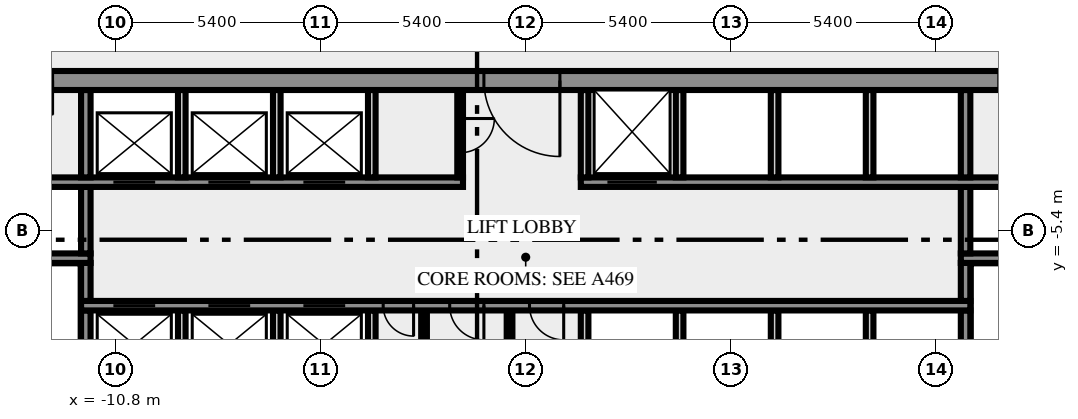
"""IFC4 building model, lengths in metres.
Left out: names, types, materials, properties, quantities, classifications, styles, units other than length and angle.
Written with IfcOpenShell. Run it as: python <this file> out.ifc"""

import sys

from ifc_helpers import new_model, si_unit, direction, frame, frame_2d, origin, place, context, subcontext, project, spatial, rectangle, extrude, element, fill, save


model = new_model("IFC4")
c1 = context("Model", 3, precision=1e-05, world=origin(), true_north=direction((0.0, 1.0)))
c2 = subcontext(c1, "Body", "Model", "MODEL_VIEW")
j1 = project(units=[si_unit("LENGTHUNIT", "METRE"), si_unit("PLANEANGLEUNIT", "RADIAN")], contexts=[c1])
p1 = place(None, origin())
s1 = spatial("IfcSite", under=j1, at=p1, CompositionType="ELEMENT")
p2 = place(p1, origin())
s2 = spatial("IfcBuilding", under=s1, at=p2, CompositionType="ELEMENT")
p3 = place(p2, frame((0.0, 0.0, 105.0)))
s3 = spatial("IfcBuildingStorey", under=s2, at=p3, CompositionType="ELEMENT", Elevation=105.0)
p4 = place(p3, frame((-11.575, -10.5, 0.0), z_axis=(0.0, 0.0, 1.0), x_axis=(0.0, 1.0, 0.0)))
e1 = element("IfcWall", 1, at=p4, inside=s3, PredefinedType="SHEAR", context=c2, shape_type="SweptSolid", body=[
    extrude(rectangle(XDim=3.0, YDim=0.25, at=frame_2d((1.5, 0.0))), origin(), (0.0, 0.0, 1.0), 3.65),
])
for number, where, z_axis, x_axis in (
    (2, (-9.05, -10.5, 0.0), (0.0, 0.0, 1.0), (0.0, 1.0, 0.0)),
    (3, (-6.55, -10.5, 0.0), (0.0, 0.0, 1.0), (0.0, 1.0, 0.0)),
    (4, (-4.05, -10.5, 0.0), (0.0, 0.0, 1.0), (0.0, 1.0, 0.0)),
):
    element("IfcWall", number, at=place(p3, frame(where, z_axis=z_axis, x_axis=x_axis)), inside=s3, PredefinedType="SOLIDWALL", context=c2, shape_type="SweptSolid", body=[
        extrude(rectangle(XDim=3.0, YDim=0.2, at=frame_2d((1.5, 0.0))), origin(), (0.0, 0.0, 1.0), 3.65),
    ])
for number, where, z_axis, x_axis in (
    (5, (-2.675, -10.5, 0.0), (0.0, 0.0, 1.0), (0.0, 1.0, 0.0)),
    (6, (-0.425, -10.5, 0.0), (0.0, 0.0, 1.0), (0.0, 1.0, 0.0)),
):
    element("IfcWall", number, at=place(p3, frame(where, z_axis=z_axis, x_axis=x_axis)), inside=s3, PredefinedType="PARTITIONING", context=c2, shape_type="SweptSolid", body=[
        extrude(rectangle(XDim=3.0, YDim=0.15, at=frame_2d((1.5, 0.0))), origin(), (0.0, 0.0, 1.0), 3.65),
    ])
for number, where, z_axis, x_axis in (
    (7, (1.55, -10.5, 0.0), (0.0, 0.0, 1.0), (0.0, 1.0, 0.0)),
    (8, (4.05, -10.5, 0.0), (0.0, 0.0, 1.0), (0.0, 1.0, 0.0)),
    (9, (6.55, -10.5, 0.0), (0.0, 0.0, 1.0), (0.0, 1.0, 0.0)),
    (10, (9.05, -10.5, 0.0), (0.0, 0.0, 1.0), (0.0, 1.0, 0.0)),
):
    element("IfcWall", number, at=place(p3, frame(where, z_axis=z_axis, x_axis=x_axis)), inside=s3, PredefinedType="SOLIDWALL", context=c2, shape_type="SweptSolid", body=[
        extrude(rectangle(XDim=3.0, YDim=0.2, at=frame_2d((1.5, 0.0))), origin(), (0.0, 0.0, 1.0), 3.65),
    ])
p5 = place(p3, frame((11.575, -10.5, 0.0), z_axis=(0.0, 0.0, 1.0), x_axis=(0.0, 1.0, 0.0)))
e11 = element("IfcWall", 11, at=p5, inside=s3, PredefinedType="SHEAR", context=c2, shape_type="SweptSolid", body=[
    extrude(rectangle(XDim=3.0, YDim=0.25, at=frame_2d((1.5, 0.0))), origin(), (0.0, 0.0, 1.0), 3.65),
])
p6 = place(p3, frame((11.7, -7.375, 0.0), z_axis=(0.0, 0.0, 1.0), x_axis=(-1.0, 0.0, 0.0)))
e12 = element("IfcWall", 12, at=p6, inside=s3, PredefinedType="SHEAR", context=c2, shape_type="SweptSolid", body=[
    extrude(rectangle(XDim=23.4, YDim=0.25, at=frame_2d((11.7, 0.0))), origin(), (0.0, 0.0, 1.0), 3.65),
])
p7 = place(p6, frame((21.45, 0.0, 0.0)))
e13 = element("IfcOpeningElement", 13, at=p7, cuts=e12, PredefinedType="OPENING", context=c2, shape_type="SweptSolid", body=[
    extrude(rectangle(XDim=1.1, YDim=2.1, at=frame_2d((0.55, 1.05))), frame((0.0, 0.135, 0.0), z_axis=(0.0, -1.0, 0.0), x_axis=(1.0, 0.0, 0.0)), (0.0, 0.0, 1.0), 0.27),
])
p8 = place(p6, frame((18.95, 0.0, 0.0)))
e14 = element("IfcOpeningElement", 14, at=p8, cuts=e12, PredefinedType="OPENING", context=c2, shape_type="SweptSolid", body=[
    extrude(rectangle(XDim=1.1, YDim=2.1, at=frame_2d((0.55, 1.05))), frame((0.0, 0.135, 0.0), z_axis=(0.0, -1.0, 0.0), x_axis=(1.0, 0.0, 0.0)), (0.0, 0.0, 1.0), 0.27),
])
p9 = place(p6, frame((16.45, 0.0, 0.0)))
e15 = element("IfcOpeningElement", 15, at=p9, cuts=e12, PredefinedType="OPENING", context=c2, shape_type="SweptSolid", body=[
    extrude(rectangle(XDim=1.1, YDim=2.1, at=frame_2d((0.55, 1.05))), frame((0.0, 0.135, 0.0), z_axis=(0.0, -1.0, 0.0), x_axis=(1.0, 0.0, 0.0)), (0.0, 0.0, 1.0), 0.27),
])
p10 = place(p6, frame((14.65, 0.0, 0.0)))
e16 = element("IfcOpeningElement", 16, at=p10, cuts=e12, PredefinedType="OPENING", context=c2, shape_type="SweptSolid", body=[
    extrude(rectangle(XDim=0.8, YDim=2.1, at=frame_2d((0.4, 1.05))), frame((0.0, 0.135, 0.0), z_axis=(0.0, -1.0, 0.0), x_axis=(1.0, 0.0, 0.0)), (0.0, 0.0, 1.0), 0.27),
])
p11 = place(p6, frame((12.8, 0.0, 0.0)))
e17 = element("IfcOpeningElement", 17, at=p11, cuts=e12, PredefinedType="OPENING", context=c2, shape_type="SweptSolid", body=[
    extrude(rectangle(XDim=0.9, YDim=2.1, at=frame_2d((0.45, 1.05))), frame((0.0, 0.135, 0.0), z_axis=(0.0, -1.0, 0.0), x_axis=(1.0, 0.0, 0.0)), (0.0, 0.0, 1.0), 0.27),
])
p12 = place(p6, frame((10.7, 0.0, 0.0)))
e18 = element("IfcOpeningElement", 18, at=p12, cuts=e12, PredefinedType="OPENING", context=c2, shape_type="SweptSolid", body=[
    extrude(rectangle(XDim=0.9, YDim=2.1, at=frame_2d((0.45, 1.05))), frame((0.0, 0.135, 0.0), z_axis=(0.0, -1.0, 0.0), x_axis=(1.0, 0.0, 0.0)), (0.0, 0.0, 1.0), 0.27),
])
for number, where, z_axis, x_axis in (
    (19, (-11.575, -7.25, 0.0), (0.0, 0.0, 1.0), (0.0, 1.0, 0.0)),
    (20, (11.575, -7.25, 0.0), (0.0, 0.0, 1.0), (0.0, 1.0, 0.0)),
):
    element("IfcWall", number, at=place(p3, frame(where, z_axis=z_axis, x_axis=x_axis)), inside=s3, PredefinedType="SHEAR", context=c2, shape_type="SweptSolid", body=[
        extrude(rectangle(XDim=1.0, YDim=0.25, at=frame_2d((0.5, 0.0))), origin(), (0.0, 0.0, 1.0), 3.65),
    ])
p13 = place(p3, frame((-11.45, -6.125, 0.0), z_axis=(0.0, 0.0, 1.0), x_axis=(-1.0, 0.0, 0.0)))
e21 = element("IfcWall", 21, at=p13, inside=s3, PredefinedType="SHEAR", context=c2, shape_type="SweptSolid", body=[
    extrude(rectangle(XDim=8.05, YDim=0.25, at=frame_2d((4.025, 0.0))), origin(), (0.0, 0.0, 1.0), 3.65),
])
p14 = place(p13, frame((6.2, 0.0, 0.0)))
e22 = element("IfcOpeningElement", 22, at=p14, cuts=e21, PredefinedType="OPENING", context=c2, shape_type="SweptSolid", body=[
    extrude(rectangle(XDim=1.8, YDim=2.1, at=frame_2d((0.9, 1.05))), frame((0.0, 0.135, 0.0), z_axis=(0.0, -1.0, 0.0), x_axis=(1.0, 0.0, 0.0)), (0.0, 0.0, 1.0), 0.27),
])
p15 = place(p3, frame((19.5, -6.125, 0.0), z_axis=(0.0, 0.0, 1.0), x_axis=(-1.0, 0.0, 0.0)))
e23 = element("IfcWall", 23, at=p15, inside=s3, PredefinedType="SHEAR", context=c2, shape_type="SweptSolid", body=[
    extrude(rectangle(XDim=8.05, YDim=0.25, at=frame_2d((4.025, 0.0))), origin(), (0.0, 0.0, 1.0), 3.65),
])
p16 = place(p15, frame((0.05, 0.0, 0.0)))
e24 = element("IfcOpeningElement", 24, at=p16, cuts=e23, PredefinedType="OPENING", context=c2, shape_type="SweptSolid", body=[
    extrude(rectangle(XDim=1.8, YDim=2.1, at=frame_2d((0.9, 1.05))), frame((0.0, 0.135, 0.0), z_axis=(0.0, -1.0, 0.0), x_axis=(1.0, 0.0, 0.0)), (0.0, 0.0, 1.0), 0.27),
])
for number, where, z_axis, x_axis in (
    (25, (-11.575, -6.0, 0.0), (0.0, 0.0, 1.0), (0.0, 1.0, 0.0)),
    (26, (11.575, -6.0, 0.0), (0.0, 0.0, 1.0), (0.0, 1.0, 0.0)),
):
    element("IfcWall", number, at=place(p3, frame(where, z_axis=z_axis, x_axis=x_axis)), inside=s3, PredefinedType="SHEAR", context=c2, shape_type="SweptSolid", body=[
        extrude(rectangle(XDim=1.75, YDim=0.25, at=frame_2d((0.875, 0.0))), origin(), (0.0, 0.0, 1.0), 3.65),
    ])
p17 = place(p3, frame((-14.35, -4.125, 0.0), z_axis=(0.0, 0.0, 1.0), x_axis=(1.0, 0.0, 0.0)))
e27 = element("IfcWall", 27, at=p17, inside=s3, PredefinedType="SHEAR", context=c2, shape_type="SweptSolid", body=[
    extrude(rectangle(XDim=12.7, YDim=0.25, at=frame_2d((6.35, 0.0))), origin(), (0.0, 0.0, 1.0), 3.65),
])
p18 = place(p17, frame((3.5, 0.0, 0.0)))
e28 = element("IfcOpeningElement", 28, at=p18, cuts=e27, PredefinedType="OPENING", context=c2, shape_type="SweptSolid", body=[
    extrude(rectangle(XDim=1.1, YDim=2.1, at=frame_2d((0.55, 1.05))), frame((0.0, 0.135, 0.0), z_axis=(0.0, -1.0, 0.0), x_axis=(1.0, 0.0, 0.0)), (0.0, 0.0, 1.0), 0.27),
])
p19 = place(p17, frame((6.0, 0.0, 0.0)))
e29 = element("IfcOpeningElement", 29, at=p19, cuts=e27, PredefinedType="OPENING", context=c2, shape_type="SweptSolid", body=[
    extrude(rectangle(XDim=1.1, YDim=2.1, at=frame_2d((0.55, 1.05))), frame((0.0, 0.135, 0.0), z_axis=(0.0, -1.0, 0.0), x_axis=(1.0, 0.0, 0.0)), (0.0, 0.0, 1.0), 0.27),
])
p20 = place(p17, frame((8.5, 0.0, 0.0)))
e30 = element("IfcOpeningElement", 30, at=p20, cuts=e27, PredefinedType="OPENING", context=c2, shape_type="SweptSolid", body=[
    extrude(rectangle(XDim=1.1, YDim=2.1, at=frame_2d((0.55, 1.05))), frame((0.0, 0.135, 0.0), z_axis=(0.0, -1.0, 0.0), x_axis=(1.0, 0.0, 0.0)), (0.0, 0.0, 1.0), 0.27),
])
p21 = place(p3, frame((1.45, -4.125, 0.0), z_axis=(0.0, 0.0, 1.0), x_axis=(1.0, 0.0, 0.0)))
e31 = element("IfcWall", 31, at=p21, inside=s3, PredefinedType="SHEAR", context=c2, shape_type="SweptSolid", body=[
    extrude(rectangle(XDim=12.9, YDim=0.25, at=frame_2d((6.45, 0.0))), origin(), (0.0, 0.0, 1.0), 3.65),
])
p22 = place(p21, frame((0.7, 0.0, 0.0)))
e32 = element("IfcOpeningElement", 32, at=p22, cuts=e31, PredefinedType="OPENING", context=c2, shape_type="SweptSolid", body=[
    extrude(rectangle(XDim=1.3, YDim=2.1, at=frame_2d((0.65, 1.05))), frame((0.0, 0.135, 0.0), z_axis=(0.0, -1.0, 0.0), x_axis=(1.0, 0.0, 0.0)), (0.0, 0.0, 1.0), 0.27),
])
p23 = place(p3, frame((-11.575, -4.0, 0.0), z_axis=(0.0, 0.0, 1.0), x_axis=(0.0, 1.0, 0.0)))
e33 = element("IfcWall", 33, at=p23, inside=s3, PredefinedType="SHEAR", context=c2, shape_type="SweptSolid", body=[
    extrude(rectangle(XDim=2.3, YDim=0.25, at=frame_2d((1.15, 0.0))), origin(), (0.0, 0.0, 1.0), 3.65),
])
for number, where, z_axis, x_axis in (
    (34, (-9.05, -4.0, 0.0), (0.0, 0.0, 1.0), (0.0, 1.0, 0.0)),
    (35, (-6.55, -4.0, 0.0), (0.0, 0.0, 1.0), (0.0, 1.0, 0.0)),
    (36, (-4.05, -4.0, 0.0), (0.0, 0.0, 1.0), (0.0, 1.0, 0.0)),
):
    element("IfcWall", number, at=place(p3, frame(where, z_axis=z_axis, x_axis=x_axis)), inside=s3, PredefinedType="SOLIDWALL", context=c2, shape_type="SweptSolid", body=[
        extrude(rectangle(XDim=2.3, YDim=0.2, at=frame_2d((1.15, 0.0))), origin(), (0.0, 0.0, 1.0), 3.65),
    ])
p24 = place(p3, frame((-1.725, -1.7, 0.0), z_axis=(0.0, 0.0, 1.0), x_axis=(0.0, -1.0, 0.0)))
e37 = element("IfcWall", 37, at=p24, inside=s3, PredefinedType="PARTITIONING", context=c2, shape_type="SweptSolid", body=[
    extrude(rectangle(XDim=2.3, YDim=0.15, at=frame_2d((1.15, 0.0))), origin(), (0.0, 0.0, 1.0), 3.65),
])
p25 = place(p24, frame((0.75, 0.0, 0.0)))
e38 = element("IfcOpeningElement", 38, at=p25, cuts=e37, PredefinedType="OPENING", context=c2, shape_type="SweptSolid", body=[
    extrude(rectangle(XDim=0.9, YDim=2.1, at=frame_2d((0.45, 1.05))), frame((0.0, 0.085, 0.0), z_axis=(0.0, -1.0, 0.0), x_axis=(1.0, 0.0, 0.0)), (0.0, 0.0, 1.0), 0.17),
])
for number, where, z_axis, x_axis in (
    (39, (1.55, -4.0, 0.0), (0.0, 0.0, 1.0), (0.0, 1.0, 0.0)),
    (40, (4.05, -4.0, 0.0), (0.0, 0.0, 1.0), (0.0, 1.0, 0.0)),
    (41, (6.55, -4.0, 0.0), (0.0, 0.0, 1.0), (0.0, 1.0, 0.0)),
    (42, (9.05, -4.0, 0.0), (0.0, 0.0, 1.0), (0.0, 1.0, 0.0)),
):
    element("IfcWall", number, at=place(p3, frame(where, z_axis=z_axis, x_axis=x_axis)), inside=s3, PredefinedType="SOLIDWALL", context=c2, shape_type="SweptSolid", body=[
        extrude(rectangle(XDim=2.3, YDim=0.2, at=frame_2d((1.15, 0.0))), origin(), (0.0, 0.0, 1.0), 3.65),
    ])
p26 = place(p3, frame((11.575, -4.0, 0.0), z_axis=(0.0, 0.0, 1.0), x_axis=(0.0, 1.0, 0.0)))
e43 = element("IfcWall", 43, at=p26, inside=s3, PredefinedType="SHEAR", context=c2, shape_type="SweptSolid", body=[
    extrude(rectangle(XDim=2.3, YDim=0.25, at=frame_2d((1.15, 0.0))), origin(), (0.0, 0.0, 1.0), 3.65),
])
p27 = place(p3, frame((20.49, -1.45, 0.0), z_axis=(0.0, 0.0, 1.0), x_axis=(-1.0, 0.0, 0.0)))
e44 = element("IfcWall", 44, at=p27, inside=s3, PredefinedType="SHEAR", context=c2, shape_type="SweptSolid", body=[
    extrude(rectangle(XDim=40.98, YDim=0.5, at=frame_2d((20.49, 0.0))), origin(), (0.0, 0.0, 1.0), 3.65),
])
p28 = place(p27, frame((38.14, 0.0, 0.0)))
e45 = element("IfcOpeningElement", 45, at=p28, cuts=e44, PredefinedType="OPENING", context=c2, shape_type="SweptSolid", body=[
    extrude(rectangle(XDim=1.8, YDim=2.1, at=frame_2d((0.9, 1.05))), frame((0.0, 0.26, 0.0), z_axis=(0.0, -1.0, 0.0), x_axis=(1.0, 0.0, 0.0)), (0.0, 0.0, 1.0), 0.52),
])
p29 = place(p27, frame((36.728, 0.0, 0.0)))
e46 = element("IfcOpeningElement", 46, at=p29, cuts=e44, PredefinedType="OPENING", context=c2, shape_type="SweptSolid", body=[
    extrude(rectangle(XDim=0.8, YDim=2.1, at=frame_2d((0.4, 1.05))), frame((0.0, 0.26, 0.0), z_axis=(0.0, -1.0, 0.0), x_axis=(1.0, 0.0, 0.0)), (0.0, 0.0, 1.0), 0.52),
])
p30 = place(p27, frame((35.153, 0.0, 0.0)))
e47 = element("IfcOpeningElement", 47, at=p30, cuts=e44, PredefinedType="OPENING", context=c2, shape_type="SweptSolid", body=[
    extrude(rectangle(XDim=0.8, YDim=2.1, at=frame_2d((0.4, 1.05))), frame((0.0, 0.26, 0.0), z_axis=(0.0, -1.0, 0.0), x_axis=(1.0, 0.0, 0.0)), (0.0, 0.0, 1.0), 0.52),
])
p31 = place(p27, frame((32.94, 0.0, 0.0)))
e48 = element("IfcOpeningElement", 48, at=p31, cuts=e44, PredefinedType="OPENING", context=c2, shape_type="SweptSolid", body=[
    extrude(rectangle(XDim=0.9, YDim=2.1, at=frame_2d((0.45, 1.05))), frame((0.0, 0.26, 0.0), z_axis=(0.0, -1.0, 0.0), x_axis=(1.0, 0.0, 0.0)), (0.0, 0.0, 1.0), 0.52),
])
p32 = place(p27, frame((19.59, 0.0, 0.0)))
e49 = element("IfcOpeningElement", 49, at=p32, cuts=e44, PredefinedType="OPENING", context=c2, shape_type="SweptSolid", body=[
    extrude(rectangle(XDim=2.0, YDim=2.1, at=frame_2d((1.0, 1.05))), frame((0.0, 0.26, 0.0), z_axis=(0.0, -1.0, 0.0), x_axis=(1.0, 0.0, 0.0)), (0.0, 0.0, 1.0), 0.52),
])
p33 = place(p27, frame((7.14, 0.0, 0.0)))
e50 = element("IfcOpeningElement", 50, at=p33, cuts=e44, PredefinedType="OPENING", context=c2, shape_type="SweptSolid", body=[
    extrude(rectangle(XDim=0.9, YDim=2.1, at=frame_2d((0.45, 1.05))), frame((0.0, 0.26, 0.0), z_axis=(0.0, -1.0, 0.0), x_axis=(1.0, 0.0, 0.0)), (0.0, 0.0, 1.0), 0.52),
])
p34 = place(p27, frame((4.19, 0.0, 0.0)))
e51 = element("IfcOpeningElement", 51, at=p34, cuts=e44, PredefinedType="OPENING", context=c2, shape_type="SweptSolid", body=[
    extrude(rectangle(XDim=0.9, YDim=2.1, at=frame_2d((0.45, 1.05))), frame((0.0, 0.26, 0.0), z_axis=(0.0, -1.0, 0.0), x_axis=(1.0, 0.0, 0.0)), (0.0, 0.0, 1.0), 0.52),
])
p35 = place(p27, frame((1.04, 0.0, 0.0)))
e52 = element("IfcOpeningElement", 52, at=p35, cuts=e44, PredefinedType="OPENING", context=c2, shape_type="SweptSolid", body=[
    extrude(rectangle(XDim=1.8, YDim=2.1, at=frame_2d((0.9, 1.05))), frame((0.0, 0.26, 0.0), z_axis=(0.0, -1.0, 0.0), x_axis=(1.0, 0.0, 0.0)), (0.0, 0.0, 1.0), 0.52),
])
p36 = place(p7, origin())
e53 = element("IfcDoor", 53, at=p36, inside=s3, OperationType="DOUBLE_DOOR_SLIDING", PredefinedType="DOOR", context=c2, shape_type="SweptSolid", body=[
    extrude(rectangle(XDim=1.1, YDim=2.1, at=frame_2d((0.55, 1.05))), frame((0.0, 0.025, 0.0), z_axis=(0.0, -1.0, 0.0), x_axis=(1.0, 0.0, 0.0)), (0.0, 0.0, 1.0), 0.05),
])
fill(e13, e53)
p37 = place(p8, origin())
e54 = element("IfcDoor", 54, at=p37, inside=s3, OperationType="DOUBLE_DOOR_SLIDING", PredefinedType="DOOR", context=c2, shape_type="SweptSolid", body=[
    extrude(rectangle(XDim=1.1, YDim=2.1, at=frame_2d((0.55, 1.05))), frame((0.0, 0.025, 0.0), z_axis=(0.0, -1.0, 0.0), x_axis=(1.0, 0.0, 0.0)), (0.0, 0.0, 1.0), 0.05),
])
fill(e14, e54)
p38 = place(p9, origin())
e55 = element("IfcDoor", 55, at=p38, inside=s3, OperationType="DOUBLE_DOOR_SLIDING", PredefinedType="DOOR", context=c2, shape_type="SweptSolid", body=[
    extrude(rectangle(XDim=1.1, YDim=2.1, at=frame_2d((0.55, 1.05))), frame((0.0, 0.025, 0.0), z_axis=(0.0, -1.0, 0.0), x_axis=(1.0, 0.0, 0.0)), (0.0, 0.0, 1.0), 0.05),
])
fill(e15, e55)
p39 = place(p10, origin())
e56 = element("IfcDoor", 56, at=p39, inside=s3, OperationType="SINGLE_SWING_RIGHT", PredefinedType="DOOR", context=c2, shape_type="SweptSolid", body=[
    extrude(rectangle(XDim=0.8, YDim=2.1, at=frame_2d((0.4, 1.05))), frame((0.0, 0.025, 0.0), z_axis=(0.0, -1.0, 0.0), x_axis=(1.0, 0.0, 0.0)), (0.0, 0.0, 1.0), 0.05),
])
fill(e16, e56)
p40 = place(p11, origin())
e57 = element("IfcDoor", 57, at=p40, inside=s3, OperationType="SINGLE_SWING_RIGHT", PredefinedType="DOOR", context=c2, shape_type="SweptSolid", body=[
    extrude(rectangle(XDim=0.9, YDim=2.1, at=frame_2d((0.45, 1.05))), frame((0.0, 0.025, 0.0), z_axis=(0.0, -1.0, 0.0), x_axis=(1.0, 0.0, 0.0)), (0.0, 0.0, 1.0), 0.05),
])
fill(e17, e57)
p41 = place(p12, origin())
e58 = element("IfcDoor", 58, at=p41, inside=s3, OperationType="SINGLE_SWING_LEFT", PredefinedType="DOOR", context=c2, shape_type="SweptSolid", body=[
    extrude(rectangle(XDim=0.9, YDim=2.1, at=frame_2d((0.45, 1.05))), frame((0.0, 0.025, 0.0), z_axis=(0.0, -1.0, 0.0), x_axis=(1.0, 0.0, 0.0)), (0.0, 0.0, 1.0), 0.05),
])
fill(e18, e58)
p42 = place(p18, origin())
e59 = element("IfcDoor", 59, at=p42, inside=s3, OperationType="DOUBLE_DOOR_SLIDING", PredefinedType="DOOR", context=c2, shape_type="SweptSolid", body=[
    extrude(rectangle(XDim=1.1, YDim=2.1, at=frame_2d((0.55, 1.05))), frame((0.0, 0.025, 0.0), z_axis=(0.0, -1.0, 0.0), x_axis=(1.0, 0.0, 0.0)), (0.0, 0.0, 1.0), 0.05),
])
fill(e28, e59)
p43 = place(p19, origin())
e60 = element("IfcDoor", 60, at=p43, inside=s3, OperationType="DOUBLE_DOOR_SLIDING", PredefinedType="DOOR", context=c2, shape_type="SweptSolid", body=[
    extrude(rectangle(XDim=1.1, YDim=2.1, at=frame_2d((0.55, 1.05))), frame((0.0, 0.025, 0.0), z_axis=(0.0, -1.0, 0.0), x_axis=(1.0, 0.0, 0.0)), (0.0, 0.0, 1.0), 0.05),
])
fill(e29, e60)
p44 = place(p20, origin())
e61 = element("IfcDoor", 61, at=p44, inside=s3, OperationType="DOUBLE_DOOR_SLIDING", PredefinedType="DOOR", context=c2, shape_type="SweptSolid", body=[
    extrude(rectangle(XDim=1.1, YDim=2.1, at=frame_2d((0.55, 1.05))), frame((0.0, 0.025, 0.0), z_axis=(0.0, -1.0, 0.0), x_axis=(1.0, 0.0, 0.0)), (0.0, 0.0, 1.0), 0.05),
])
fill(e30, e61)
p45 = place(p22, origin())
e62 = element("IfcDoor", 62, at=p45, inside=s3, OperationType="DOUBLE_DOOR_SLIDING", PredefinedType="DOOR", context=c2, shape_type="SweptSolid", body=[
    extrude(rectangle(XDim=1.3, YDim=2.1, at=frame_2d((0.65, 1.05))), frame((0.0, 0.025, 0.0), z_axis=(0.0, -1.0, 0.0), x_axis=(1.0, 0.0, 0.0)), (0.0, 0.0, 1.0), 0.05),
])
fill(e32, e62)
p46 = place(p25, origin())
e63 = element("IfcDoor", 63, at=p46, inside=s3, OperationType="SINGLE_SWING_RIGHT", PredefinedType="DOOR", context=c2, shape_type="SweptSolid", body=[
    extrude(rectangle(XDim=0.9, YDim=2.1, at=frame_2d((0.45, 1.05))), frame((0.0, 0.025, 0.0), z_axis=(0.0, -1.0, 0.0), x_axis=(1.0, 0.0, 0.0)), (0.0, 0.0, 1.0), 0.05),
])
fill(e38, e63)
p47 = place(p32, origin())
e64 = element("IfcDoor", 64, at=p47, inside=s3, OperationType="DOUBLE_DOOR_SINGLE_SWING", PredefinedType="DOOR", context=c2, shape_type="SweptSolid", body=[
    extrude(rectangle(XDim=2.0, YDim=2.1, at=frame_2d((1.0, 1.05))), frame((0.0, 0.025, 0.0), z_axis=(0.0, -1.0, 0.0), x_axis=(1.0, 0.0, 0.0)), (0.0, 0.0, 1.0), 0.05),
])
fill(e49, e64)
save(model, sys.argv[1])
